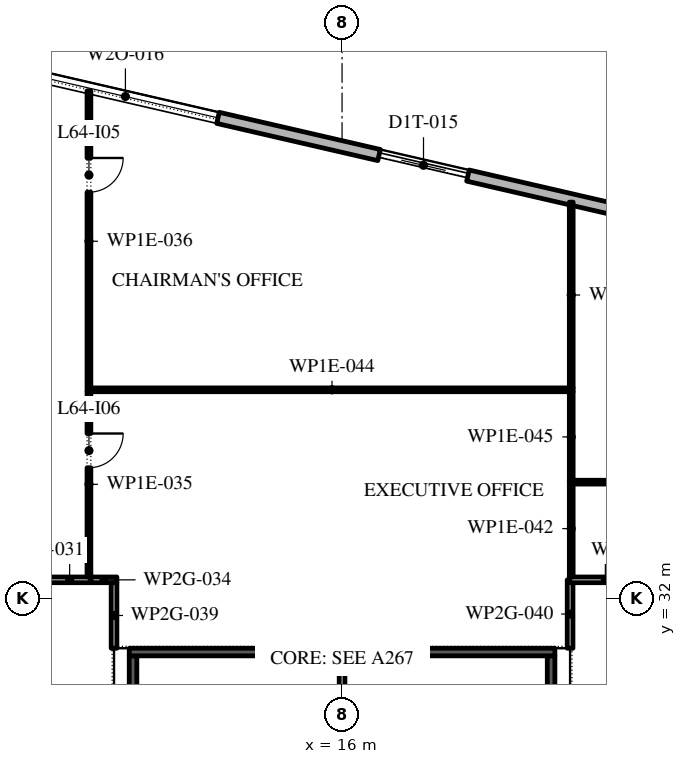
"""IFC4 building model, lengths in metres.
Left out: names, types, materials, properties, quantities, classifications, styles, units other than length and angle.
Written with IfcOpenShell. Run it as: python <this file> out.ifc"""

import sys

from ifc_helpers import new_model, si_unit, direction, frame, frame_2d, origin, place, context, subcontext, project, spatial, rectangle, extrude, element, fill, save


model = new_model("IFC4")
c1 = context("Model", 3, precision=1e-05, world=origin(), true_north=direction((0.0, 1.0)))
c2 = subcontext(c1, "Body", "Model", "MODEL_VIEW")
j1 = project(units=[si_unit("LENGTHUNIT", "METRE"), si_unit("PLANEANGLEUNIT", "RADIAN")], contexts=[c1])
p1 = place(None, origin())
s1 = spatial("IfcSite", under=j1, at=p1, CompositionType="ELEMENT")
p2 = place(p1, origin())
s2 = spatial("IfcBuilding", under=s1, at=p2, CompositionType="ELEMENT")
p3 = place(p2, frame((0.0, 0.0, 293.4)))
s3 = spatial("IfcBuildingStorey", under=s2, at=p3, CompositionType="ELEMENT", Elevation=293.4)
p4 = place(p3, frame((21.359, -11.678, 0.0), z_axis=(0.0, 0.0, 1.0), x_axis=(0.224949198343, 0.974370493275, 0.0)))
e1 = element("IfcWall", 1, at=p4, inside=s3, PredefinedType="STANDARD", context=c2, shape_type="SweptSolid", body=[
    extrude(rectangle(XDim=49.5, YDim=0.3, at=frame_2d((24.75, 0.0))), origin(), (0.0, 0.0, 1.0), 3.75),
])
p5 = place(p4, frame((0.907, 0.0, 0.45)))
e2 = element("IfcOpeningElement", 2, at=p5, cuts=e1, PredefinedType="OPENING", context=c2, shape_type="SweptSolid", body=[
    extrude(rectangle(XDim=5.0, YDim=3.25, at=frame_2d((2.5, 1.625))), frame((0.0, 0.16, 0.0), z_axis=(0.0, -1.0, 0.0), x_axis=(1.0, 0.0, 0.0)), (0.0, 0.0, 1.0), 0.32),
])
p6 = place(p4, frame((7.871, 0.0, 0.45)))
e3 = element("IfcOpeningElement", 3, at=p6, cuts=e1, PredefinedType="OPENING", context=c2, shape_type="SweptSolid", body=[
    extrude(rectangle(XDim=5.0, YDim=2.85, at=frame_2d((2.5, 1.425))), frame((0.0, 0.16, 0.0), z_axis=(0.0, -1.0, 0.0), x_axis=(1.0, 0.0, 0.0)), (0.0, 0.0, 1.0), 0.32),
])
p7 = place(p4, frame((14.986, 0.0, 0.45)))
e4 = element("IfcOpeningElement", 4, at=p7, cuts=e1, PredefinedType="OPENING", context=c2, shape_type="SweptSolid", body=[
    extrude(rectangle(XDim=5.0, YDim=2.85, at=frame_2d((2.5, 1.425))), frame((0.0, 0.16, 0.0), z_axis=(0.0, -1.0, 0.0), x_axis=(1.0, 0.0, 0.0)), (0.0, 0.0, 1.0), 0.32),
])
p8 = place(p4, frame((22.1, 0.0, 0.45)))
e5 = element("IfcOpeningElement", 5, at=p8, cuts=e1, PredefinedType="OPENING", context=c2, shape_type="SweptSolid", body=[
    extrude(rectangle(XDim=5.0, YDim=2.8, at=frame_2d((2.5, 1.4))), frame((0.0, 0.16, 0.0), z_axis=(0.0, -1.0, 0.0), x_axis=(1.0, 0.0, 0.0)), (0.0, 0.0, 1.0), 0.32),
])
p9 = place(p4, frame((29.214, 0.0, 0.45)))
e6 = element("IfcOpeningElement", 6, at=p9, cuts=e1, PredefinedType="OPENING", context=c2, shape_type="SweptSolid", body=[
    extrude(rectangle(XDim=5.0, YDim=2.7, at=frame_2d((2.5, 1.35))), frame((0.0, 0.16, 0.0), z_axis=(0.0, -1.0, 0.0), x_axis=(1.0, 0.0, 0.0)), (0.0, 0.0, 1.0), 0.32),
])
p10 = place(p4, frame((37.628, 0.0, 0.0)))
e7 = element("IfcOpeningElement", 7, at=p10, cuts=e1, PredefinedType="OPENING", context=c2, shape_type="SweptSolid", body=[
    extrude(rectangle(XDim=2.4, YDim=2.65, at=frame_2d((1.2, 1.325))), frame((0.0, 0.16, 0.0), z_axis=(0.0, -1.0, 0.0), x_axis=(1.0, 0.0, 0.0)), (0.0, 0.0, 1.0), 0.32),
])
p11 = place(p4, frame((43.443, 0.0, 0.45)))
e8 = element("IfcOpeningElement", 8, at=p11, cuts=e1, PredefinedType="OPENING", context=c2, shape_type="SweptSolid", body=[
    extrude(rectangle(XDim=5.0, YDim=3.25, at=frame_2d((2.5, 1.625))), frame((0.0, 0.16, 0.0), z_axis=(0.0, -1.0, 0.0), x_axis=(1.0, 0.0, 0.0)), (0.0, 0.0, 1.0), 0.32),
])
p12 = place(p3, frame((29.616, 40.758, 0.0), z_axis=(0.0, 0.0, 1.0), x_axis=(-0.974370532314, 0.224949029246, 0.0)))
e9 = element("IfcWall", 9, at=p12, inside=s3, PredefinedType="STANDARD", context=c2, shape_type="SweptSolid", body=[
    extrude(rectangle(XDim=48.0, YDim=0.3, at=frame_2d((24.0, 0.0))), origin(), (0.0, 0.0, 1.0), 3.75),
])
p13 = place(p12, frame((1.375, 0.0, 0.45)))
e10 = element("IfcOpeningElement", 10, at=p13, cuts=e9, PredefinedType="OPENING", context=c2, shape_type="SweptSolid", body=[
    extrude(rectangle(XDim=5.0, YDim=2.2, at=frame_2d((2.5, 1.1))), frame((0.0, 0.16, 0.0), z_axis=(0.0, -1.0, 0.0), x_axis=(1.0, 0.0, 0.0)), (0.0, 0.0, 1.0), 0.32),
])
p14 = place(p12, frame((10.575, 0.0, 0.0)))
e11 = element("IfcOpeningElement", 11, at=p14, cuts=e9, PredefinedType="OPENING", context=c2, shape_type="SweptSolid", body=[
    extrude(rectangle(XDim=2.4, YDim=2.65, at=frame_2d((1.2, 1.325))), frame((0.0, 0.16, 0.0), z_axis=(0.0, -1.0, 0.0), x_axis=(1.0, 0.0, 0.0)), (0.0, 0.0, 1.0), 0.32),
])
p15 = place(p12, frame((17.325, 0.0, 0.45)))
e12 = element("IfcOpeningElement", 12, at=p15, cuts=e9, PredefinedType="OPENING", context=c2, shape_type="SweptSolid", body=[
    extrude(rectangle(XDim=5.0, YDim=2.2, at=frame_2d((2.5, 1.1))), frame((0.0, 0.16, 0.0), z_axis=(0.0, -1.0, 0.0), x_axis=(1.0, 0.0, 0.0)), (0.0, 0.0, 1.0), 0.32),
])
p16 = place(p12, frame((25.375, 0.0, 0.45)))
e13 = element("IfcOpeningElement", 13, at=p16, cuts=e9, PredefinedType="OPENING", context=c2, shape_type="SweptSolid", body=[
    extrude(rectangle(XDim=5.0, YDim=2.2, at=frame_2d((2.5, 1.1))), frame((0.0, 0.16, 0.0), z_axis=(0.0, -1.0, 0.0), x_axis=(1.0, 0.0, 0.0)), (0.0, 0.0, 1.0), 0.32),
])
p17 = place(p12, frame((33.425, 0.0, 0.45)))
e14 = element("IfcOpeningElement", 14, at=p17, cuts=e9, PredefinedType="OPENING", context=c2, shape_type="SweptSolid", body=[
    extrude(rectangle(XDim=5.0, YDim=2.2, at=frame_2d((2.5, 1.1))), frame((0.0, 0.16, 0.0), z_axis=(0.0, -1.0, 0.0), x_axis=(1.0, 0.0, 0.0)), (0.0, 0.0, 1.0), 0.32),
])
p18 = place(p12, frame((42.175, 0.0, 0.0)))
e15 = element("IfcOpeningElement", 15, at=p18, cuts=e9, PredefinedType="OPENING", context=c2, shape_type="SweptSolid", body=[
    extrude(rectangle(XDim=2.4, YDim=3.5, at=frame_2d((1.2, 1.75))), frame((0.0, 0.16, 0.0), z_axis=(0.0, -1.0, 0.0), x_axis=(1.0, 0.0, 0.0)), (0.0, 0.0, 1.0), 0.32),
])
p19 = place(p3, frame((21.5, 25.75, 0.0), z_axis=(0.0, 0.0, 1.0), x_axis=(0.0, 1.0, 0.0)))
e16 = element("IfcWall", 16, at=p19, inside=s3, PredefinedType="SHEAR", context=c2, shape_type="SweptSolid", body=[
    extrude(rectangle(XDim=4.75, YDim=0.2, at=frame_2d((2.375, 0.0))), origin(), (0.0, 0.0, 1.0), 3.75),
])
p20 = place(p19, frame((1.925, 0.0, 0.0)))
e17 = element("IfcOpeningElement", 17, at=p20, cuts=e16, PredefinedType="OPENING", context=c2, shape_type="SweptSolid", body=[
    extrude(rectangle(XDim=0.9, YDim=2.1, at=frame_2d((0.45, 1.05))), frame((0.0, 0.11, 0.0), z_axis=(0.0, -1.0, 0.0), x_axis=(1.0, 0.0, 0.0)), (0.0, 0.0, 1.0), 0.22),
])
p21 = place(p3, frame((10.5, 25.75, 0.0), z_axis=(0.0, 0.0, 1.0), x_axis=(0.0, 1.0, 0.0)))
e18 = element("IfcWall", 18, at=p21, inside=s3, PredefinedType="SHEAR", context=c2, shape_type="SweptSolid", body=[
    extrude(rectangle(XDim=4.75, YDim=0.2, at=frame_2d((2.375, 0.0))), origin(), (0.0, 0.0, 1.0), 3.75),
])
p22 = place(p21, frame((1.925, 0.0, 0.0)))
e19 = element("IfcOpeningElement", 19, at=p22, cuts=e18, PredefinedType="OPENING", context=c2, shape_type="SweptSolid", body=[
    extrude(rectangle(XDim=0.9, YDim=2.1, at=frame_2d((0.45, 1.05))), frame((0.0, 0.11, 0.0), z_axis=(0.0, -1.0, 0.0), x_axis=(1.0, 0.0, 0.0)), (0.0, 0.0, 1.0), 0.22),
])
p23 = place(p3, frame((10.4, 30.6, 0.0), z_axis=(0.0, 0.0, 1.0), x_axis=(1.0, 0.0, 0.0)))
e20 = element("IfcWall", 20, at=p23, inside=s3, PredefinedType="SHEAR", context=c2, shape_type="SweptSolid", body=[
    extrude(rectangle(XDim=11.2, YDim=0.2, at=frame_2d((5.6, 0.0))), origin(), (0.0, 0.0, 1.0), 3.75),
])
p24 = place(p3, frame((16.0, 25.75, 0.0), z_axis=(0.0, 0.0, 1.0), x_axis=(0.0, 1.0, 0.0)))
e21 = element("IfcWall", 21, at=p24, inside=s3, PredefinedType="PARTITIONING", context=c2, shape_type="SweptSolid", body=[
    extrude(rectangle(XDim=4.75, YDim=0.15, at=frame_2d((2.375, 0.0))), origin(), (0.0, 0.0, 1.0), 3.75),
])
p25 = place(p3, frame((8.275, 32.5, 0.0), z_axis=(0.0, 0.0, 1.0), x_axis=(1.0, 0.0, 0.0)))
e22 = element("IfcWall", 22, at=p25, inside=s3, PredefinedType="PARTITIONING", context=c2, shape_type="SweptSolid", body=[
    extrude(rectangle(XDim=1.115, YDim=0.15, at=frame_2d((0.558, 0.0))), origin(), (0.0, 0.0, 1.0), 3.75),
])
p26 = place(p3, frame((9.39, 32.5, 0.0), z_axis=(0.0, 0.0, 1.0), x_axis=(1.0, 0.0, 0.0)))
e23 = element("IfcWall", 23, at=p26, inside=s3, PredefinedType="PARTITIONING", context=c2, shape_type="SweptSolid", body=[
    extrude(rectangle(XDim=0.685, YDim=0.15, at=frame_2d((0.343, 0.0))), origin(), (0.0, 0.0, 1.0), 3.75),
])
p27 = place(p3, frame((9.34, 37.45, 0.0), z_axis=(0.0, 0.0, 1.0), x_axis=(0.0, -1.0, 0.0)))
e24 = element("IfcWall", 24, at=p27, inside=s3, PredefinedType="PARTITIONING", context=c2, shape_type="SweptSolid", body=[
    extrude(rectangle(XDim=4.875, YDim=0.1, at=frame_2d((2.438, 0.0))), origin(), (0.0, 0.0, 1.0), 3.75),
])
p28 = place(p27, frame((1.1, 0.0, 0.0)))
e25 = element("IfcOpeningElement", 25, at=p28, cuts=e24, PredefinedType="OPENING", context=c2, shape_type="SweptSolid", body=[
    extrude(rectangle(XDim=0.9, YDim=2.1, at=frame_2d((0.45, 1.05))), frame((0.0, 0.06, 0.0), z_axis=(0.0, -1.0, 0.0), x_axis=(1.0, 0.0, 0.0)), (0.0, 0.0, 1.0), 0.12),
])
p29 = place(p3, frame((9.34, 45.368, 0.0), z_axis=(0.0, 0.0, 1.0), x_axis=(0.0, -1.0, 0.0)))
e26 = element("IfcWall", 26, at=p29, inside=s3, PredefinedType="PARTITIONING", context=c2, shape_type="SweptSolid", body=[
    extrude(rectangle(XDim=7.918, YDim=0.1, at=frame_2d((3.959, 0.0))), origin(), (0.0, 0.0, 1.0), 3.75),
])
p30 = place(p29, frame((1.768, 0.0, 0.0)))
e27 = element("IfcOpeningElement", 27, at=p30, cuts=e26, PredefinedType="OPENING", context=c2, shape_type="SweptSolid", body=[
    extrude(rectangle(XDim=0.9, YDim=2.1, at=frame_2d((0.45, 1.05))), frame((0.0, 0.06, 0.0), z_axis=(0.0, -1.0, 0.0), x_axis=(1.0, 0.0, 0.0)), (0.0, 0.0, 1.0), 0.12),
])
p31 = place(p3, frame((10.0, 32.425, 0.0), z_axis=(0.0, 0.0, 1.0), x_axis=(0.0, -1.0, 0.0)))
e28 = element("IfcWall", 28, at=p31, inside=s3, PredefinedType="PARTITIONING", context=c2, shape_type="SweptSolid", body=[
    extrude(rectangle(XDim=1.725, YDim=0.15, at=frame_2d((0.863, 0.0))), origin(), (0.0, 0.0, 1.0), 3.75),
])
p32 = place(p3, frame((22.0, 30.7, 0.0), z_axis=(0.0, 0.0, 1.0), x_axis=(0.0, 1.0, 0.0)))
e29 = element("IfcWall", 29, at=p32, inside=s3, PredefinedType="PARTITIONING", context=c2, shape_type="SweptSolid", body=[
    extrude(rectangle(XDim=1.8, YDim=0.15, at=frame_2d((0.9, 0.0))), origin(), (0.0, 0.0, 1.0), 3.75),
])
p33 = place(p3, frame((21.98, 32.5, 0.0), z_axis=(0.0, 0.0, 1.0), x_axis=(1.0, 0.0, 0.0)))
e30 = element("IfcWall", 30, at=p33, inside=s3, PredefinedType="PARTITIONING", context=c2, shape_type="SweptSolid", body=[
    extrude(rectangle(XDim=1.895, YDim=0.15, at=frame_2d((0.948, 0.0))), origin(), (0.0, 0.0, 1.0), 3.75),
])
p34 = place(p3, frame((22.03, 35.12, 0.0), z_axis=(0.0, 0.0, 1.0), x_axis=(0.0, -1.0, 0.0)))
e31 = element("IfcWall", 31, at=p34, inside=s3, PredefinedType="PARTITIONING", context=c2, shape_type="SweptSolid", body=[
    extrude(rectangle(XDim=2.545, YDim=0.1, at=frame_2d((1.272, 0.0))), origin(), (0.0, 0.0, 1.0), 3.75),
])
p35 = place(p3, frame((22.08, 35.07, 0.0), z_axis=(0.0, 0.0, 1.0), x_axis=(1.0, 0.0, 0.0)))
e32 = element("IfcWall", 32, at=p35, inside=s3, PredefinedType="PARTITIONING", context=c2, shape_type="SweptSolid", body=[
    extrude(rectangle(XDim=8.45, YDim=0.1, at=frame_2d((4.225, 0.0))), origin(), (0.0, 0.0, 1.0), 3.75),
])
p36 = place(p35, frame((3.8, 0.0, 0.0)))
e33 = element("IfcOpeningElement", 33, at=p36, cuts=e32, PredefinedType="OPENING", context=c2, shape_type="SweptSolid", body=[
    extrude(rectangle(XDim=0.9, YDim=2.1, at=frame_2d((0.45, 1.05))), frame((0.0, 0.06, 0.0), z_axis=(0.0, -1.0, 0.0), x_axis=(1.0, 0.0, 0.0)), (0.0, 0.0, 1.0), 0.12),
])
p37 = place(p3, frame((22.08, 37.5, 0.0), z_axis=(0.0, 0.0, 1.0), x_axis=(-1.0, 0.0, 0.0)))
e34 = element("IfcWall", 34, at=p37, inside=s3, PredefinedType="PARTITIONING", context=c2, shape_type="SweptSolid", body=[
    extrude(rectangle(XDim=12.69, YDim=0.1, at=frame_2d((6.345, 0.0))), origin(), (0.0, 0.0, 1.0), 3.75),
])
p38 = place(p3, frame((22.03, 37.45, 0.0), z_axis=(0.0, 0.0, 1.0), x_axis=(0.0, -1.0, 0.0)))
e35 = element("IfcWall", 35, at=p38, inside=s3, PredefinedType="PARTITIONING", context=c2, shape_type="SweptSolid", body=[
    extrude(rectangle(XDim=2.38, YDim=0.1, at=frame_2d((1.19, 0.0))), origin(), (0.0, 0.0, 1.0), 3.75),
])
p39 = place(p3, frame((22.03, 42.438, 0.0), z_axis=(0.0, 0.0, 1.0), x_axis=(0.0, -1.0, 0.0)))
e36 = element("IfcWall", 36, at=p39, inside=s3, PredefinedType="PARTITIONING", context=c2, shape_type="SweptSolid", body=[
    extrude(rectangle(XDim=4.888, YDim=0.1, at=frame_2d((2.444, 0.0))), origin(), (0.0, 0.0, 1.0), 3.75),
])
p40 = place(p14, origin())
e37 = element("IfcDoor", 37, at=p40, inside=s3, OperationType="DOUBLE_DOOR_SLIDING", PredefinedType="DOOR", context=c2, shape_type="SweptSolid", body=[
    extrude(rectangle(XDim=2.4, YDim=2.65, at=frame_2d((1.2, 1.325))), frame((0.0, 0.025, 0.0), z_axis=(0.0, -1.0, 0.0), x_axis=(1.0, 0.0, 0.0)), (0.0, 0.0, 1.0), 0.05),
])
fill(e11, e37)
p41 = place(p15, origin())
e38 = element("IfcWindow", 38, at=p41, inside=s3, PartitioningType="DOUBLE_PANEL_VERTICAL", PredefinedType="WINDOW", context=c2, shape_type="SweptSolid", body=[
    extrude(rectangle(XDim=5.0, YDim=2.2, at=frame_2d((2.5, 1.1))), frame((0.0, 0.03, 0.0), z_axis=(0.0, -1.0, 0.0), x_axis=(1.0, 0.0, 0.0)), (0.0, 0.0, 1.0), 0.06),
])
fill(e12, e38)
p42 = place(p30, origin())
e39 = element("IfcDoor", 39, at=p42, inside=s3, OperationType="SINGLE_SWING_RIGHT", PredefinedType="DOOR", context=c2, shape_type="SweptSolid", body=[
    extrude(rectangle(XDim=0.9, YDim=2.1, at=frame_2d((0.45, 1.05))), frame((0.0, 0.025, 0.0), z_axis=(0.0, -1.0, 0.0), x_axis=(1.0, 0.0, 0.0)), (0.0, 0.0, 1.0), 0.05),
])
fill(e27, e39)
p43 = place(p28, origin())
e40 = element("IfcDoor", 40, at=p43, inside=s3, OperationType="SINGLE_SWING_RIGHT", PredefinedType="DOOR", context=c2, shape_type="SweptSolid", body=[
    extrude(rectangle(XDim=0.9, YDim=2.1, at=frame_2d((0.45, 1.05))), frame((0.0, 0.025, 0.0), z_axis=(0.0, -1.0, 0.0), x_axis=(1.0, 0.0, 0.0)), (0.0, 0.0, 1.0), 0.05),
])
fill(e25, e40)
save(model, sys.argv[1])
